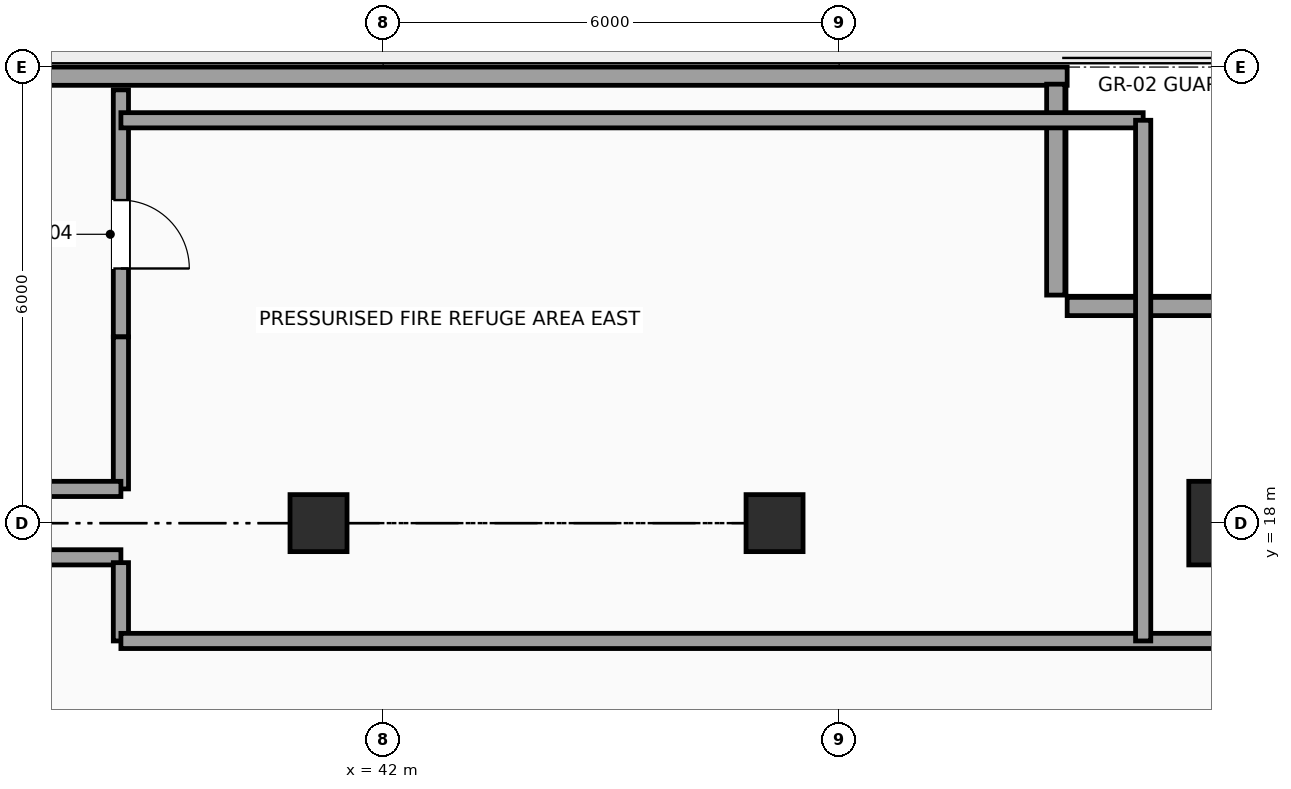
"""IFC4 building model, lengths in metres.
Left out: names, types, materials, properties, quantities, classifications, styles, units other than length and angle.
Written with IfcOpenShell. Run it as: python <this file> out.ifc"""

import sys

from ifc_helpers import new_model, si_unit, direction, frame, frame_2d, origin, origin_2d, place, context, subcontext, project, spatial, rectangle, hollow_rectangle, extrude, element, fill, save


model = new_model("IFC4")
c1 = context("Model", 3, precision=1e-05, world=origin(), true_north=direction((0.0, 1.0)))
c2 = subcontext(c1, "Body", "Model", "MODEL_VIEW")
j1 = project(units=[si_unit("LENGTHUNIT", "METRE"), si_unit("PLANEANGLEUNIT", "RADIAN")], contexts=[c1])
p1 = place(None, origin())
s1 = spatial("IfcSite", under=j1, at=p1, CompositionType="ELEMENT")
p2 = place(p1, origin())
s2 = spatial("IfcBuilding", under=s1, at=p2, CompositionType="ELEMENT")
p3 = place(p2, frame((0.0, 0.0, 27.6)))
s3 = spatial("IfcBuildingStorey", under=s2, at=p3, CompositionType="ELEMENT", Elevation=27.6)
for number, where, z_axis, x_axis in (
    (1, (41.15, 18.0, -0.35), (0.0, 0.0, 1.0), (1.0, 0.0, 0.0)),
    (2, (47.15, 18.0, -0.35), (0.0, 0.0, 1.0), (1.0, 0.0, 0.0)),
):
    element("IfcColumn", number, at=place(p3, frame(where, z_axis=z_axis, x_axis=x_axis)), inside=s3, PredefinedType="COLUMN", context=c2, shape_type="SweptSolid", body=[
        extrude(hollow_rectangle(XDim=0.75, YDim=0.75, WallThickness=0.035, InnerFilletRadius=0.035, OuterFilletRadius=0.05, at=origin_2d()), origin(), (0.0, 0.0, 1.0), 5.15),
    ])
p4 = place(p3, frame((53.15, 18.0, -0.35), z_axis=(0.0, 0.0, 1.0), x_axis=(1.0, 0.0, 0.0)))
e3 = element("IfcColumn", 3, at=p4, inside=s3, PredefinedType="COLUMN", context=c2, shape_type="SweptSolid", body=[
    extrude(rectangle(XDim=1.1, YDim=1.1, at=origin_2d()), origin(), (0.0, 0.0, 1.0), 5.15),
])
p5 = place(p3, frame((24.0, 23.88, 0.0), z_axis=(0.0, 0.0, 1.0), x_axis=(1.0, 0.0, 0.0)))
e4 = element("IfcWall", 4, at=p5, inside=s3, PredefinedType="SOLIDWALL", context=c2, shape_type="SweptSolid", body=[
    extrude(rectangle(XDim=27.0, YDim=0.24, at=frame_2d((13.5, 0.0))), origin(), (0.0, 0.0, 1.0), 4.55),
])
p6 = place(p5, frame((10.6, 0.0, 0.0)))
e5 = element("IfcOpeningElement", 5, at=p6, cuts=e4, PredefinedType="OPENING", context=c2, shape_type="SweptSolid", body=[
    extrude(rectangle(XDim=1.8, YDim=2.4, at=frame_2d((0.9, 1.2))), frame((0.0, 0.13, 0.0), z_axis=(0.0, -1.0, 0.0), x_axis=(1.0, 0.0, 0.0)), (0.0, 0.0, 1.0), 0.26),
])
for number, where, z_axis, x_axis in (
    (6, (50.85, 23.775, 0.0), (0.0, 0.0, 1.0), (0.0, -1.0, 0.0)),
    (7, (51.0, 20.85, 0.0), (0.0, 0.0, 1.0), (1.0, 0.0, 0.0)),
):
    element("IfcWall", number, at=place(p3, frame(where, z_axis=z_axis, x_axis=x_axis)), inside=s3, PredefinedType="SOLIDWALL", context=c2, shape_type="SweptSolid", body=[
        extrude(rectangle(XDim=2.775, YDim=0.24, at=frame_2d((1.387, 0.0))), origin(), (0.0, 0.0, 1.0), 4.55),
    ])
p7 = place(p3, frame((38.55, 23.7, 0.0), z_axis=(0.0, 0.0, 1.0), x_axis=(0.0, -1.0, 0.0)))
e8 = element("IfcWall", 8, at=p7, inside=s3, PredefinedType="SOLIDWALL", context=c2, shape_type="SweptSolid", body=[
    extrude(rectangle(XDim=3.25, YDim=0.2, at=frame_2d((1.625, 0.0))), origin(), (0.0, 0.0, 1.0), 4.55),
])
p8 = place(p7, frame((1.45, 0.0, 0.0)))
e9 = element("IfcOpeningElement", 9, at=p8, cuts=e8, PredefinedType="OPENING", context=c2, shape_type="SweptSolid", body=[
    extrude(rectangle(XDim=0.9, YDim=2.15, at=frame_2d((0.45, 1.075))), frame((0.0, 0.11, 0.0), z_axis=(0.0, -1.0, 0.0), x_axis=(1.0, 0.0, 0.0)), (0.0, 0.0, 1.0), 0.22),
])
p9 = place(p3, frame((38.55, 20.45, 0.0), z_axis=(0.0, 0.0, 1.0), x_axis=(0.0, -1.0, 0.0)))
e10 = element("IfcWall", 10, at=p9, inside=s3, PredefinedType="SOLIDWALL", context=c2, shape_type="SweptSolid", body=[
    extrude(rectangle(XDim=2.0, YDim=0.2, at=frame_2d((1.0, 0.0))), origin(), (0.0, 0.0, 1.0), 4.55),
])
for number, where, z_axis, x_axis in (
    (11, (38.55, 18.45, 0.0), (0.0, 0.0, 1.0), (-1.0, 0.0, 0.0)),
    (12, (36.383, 17.55, 0.0), (0.0, 0.0, 1.0), (1.0, 0.0, 0.0)),
):
    element("IfcWall", number, at=place(p3, frame(where, z_axis=z_axis, x_axis=x_axis)), inside=s3, PredefinedType="SOLIDWALL", context=c2, shape_type="SweptSolid", body=[
        extrude(rectangle(XDim=2.167, YDim=0.2, at=frame_2d((1.083, 0.0))), origin(), (0.0, 0.0, 1.0), 4.55),
    ])
p10 = place(p3, frame((38.55, 17.48, 0.0), z_axis=(0.0, 0.0, 1.0), x_axis=(0.0, -1.0, 0.0)))
e13 = element("IfcWall", 13, at=p10, inside=s3, PredefinedType="SOLIDWALL", context=c2, shape_type="SweptSolid", body=[
    extrude(rectangle(XDim=1.03, YDim=0.2, at=frame_2d((0.515, 0.0))), origin(), (0.0, 0.0, 1.0), 4.55),
])
p11 = place(p3, frame((38.55, 16.45, 0.0), z_axis=(0.0, 0.0, 1.0), x_axis=(1.0, 0.0, 0.0)))
e14 = element("IfcWall", 14, at=p11, inside=s3, PredefinedType="SOLIDWALL", context=c2, shape_type="SweptSolid", body=[
    extrude(rectangle(XDim=15.15, YDim=0.2, at=frame_2d((7.575, 0.0))), origin(), (0.0, 0.0, 1.0), 4.55),
])
p12 = place(p3, frame((38.55, 23.3, 0.0), z_axis=(0.0, 0.0, 1.0), x_axis=(1.0, 0.0, 0.0)))
e15 = element("IfcWall", 15, at=p12, inside=s3, PredefinedType="SOLIDWALL", context=c2, shape_type="SweptSolid", body=[
    extrude(rectangle(XDim=13.45, YDim=0.2, at=frame_2d((6.725, 0.0))), origin(), (0.0, 0.0, 1.0), 4.55),
])
p13 = place(p3, frame((52.0, 16.45, 0.0), z_axis=(0.0, 0.0, 1.0), x_axis=(0.0, 1.0, 0.0)))
e16 = element("IfcWall", 16, at=p13, inside=s3, PredefinedType="SOLIDWALL", context=c2, shape_type="SweptSolid", body=[
    extrude(rectangle(XDim=6.85, YDim=0.2, at=frame_2d((3.425, 0.0))), origin(), (0.0, 0.0, 1.0), 4.55),
])
p14 = place(p8, origin())
e17 = element("IfcDoor", 17, at=p14, inside=s3, OperationType="SINGLE_SWING_RIGHT", PredefinedType="DOOR", context=c2, shape_type="SweptSolid", body=[
    extrude(rectangle(XDim=0.9, YDim=2.15, at=frame_2d((0.45, 1.075))), frame((0.0, 0.025, 0.0), z_axis=(0.0, -1.0, 0.0), x_axis=(1.0, 0.0, 0.0)), (0.0, 0.0, 1.0), 0.05),
])
fill(e9, e17)
save(model, sys.argv[1])
